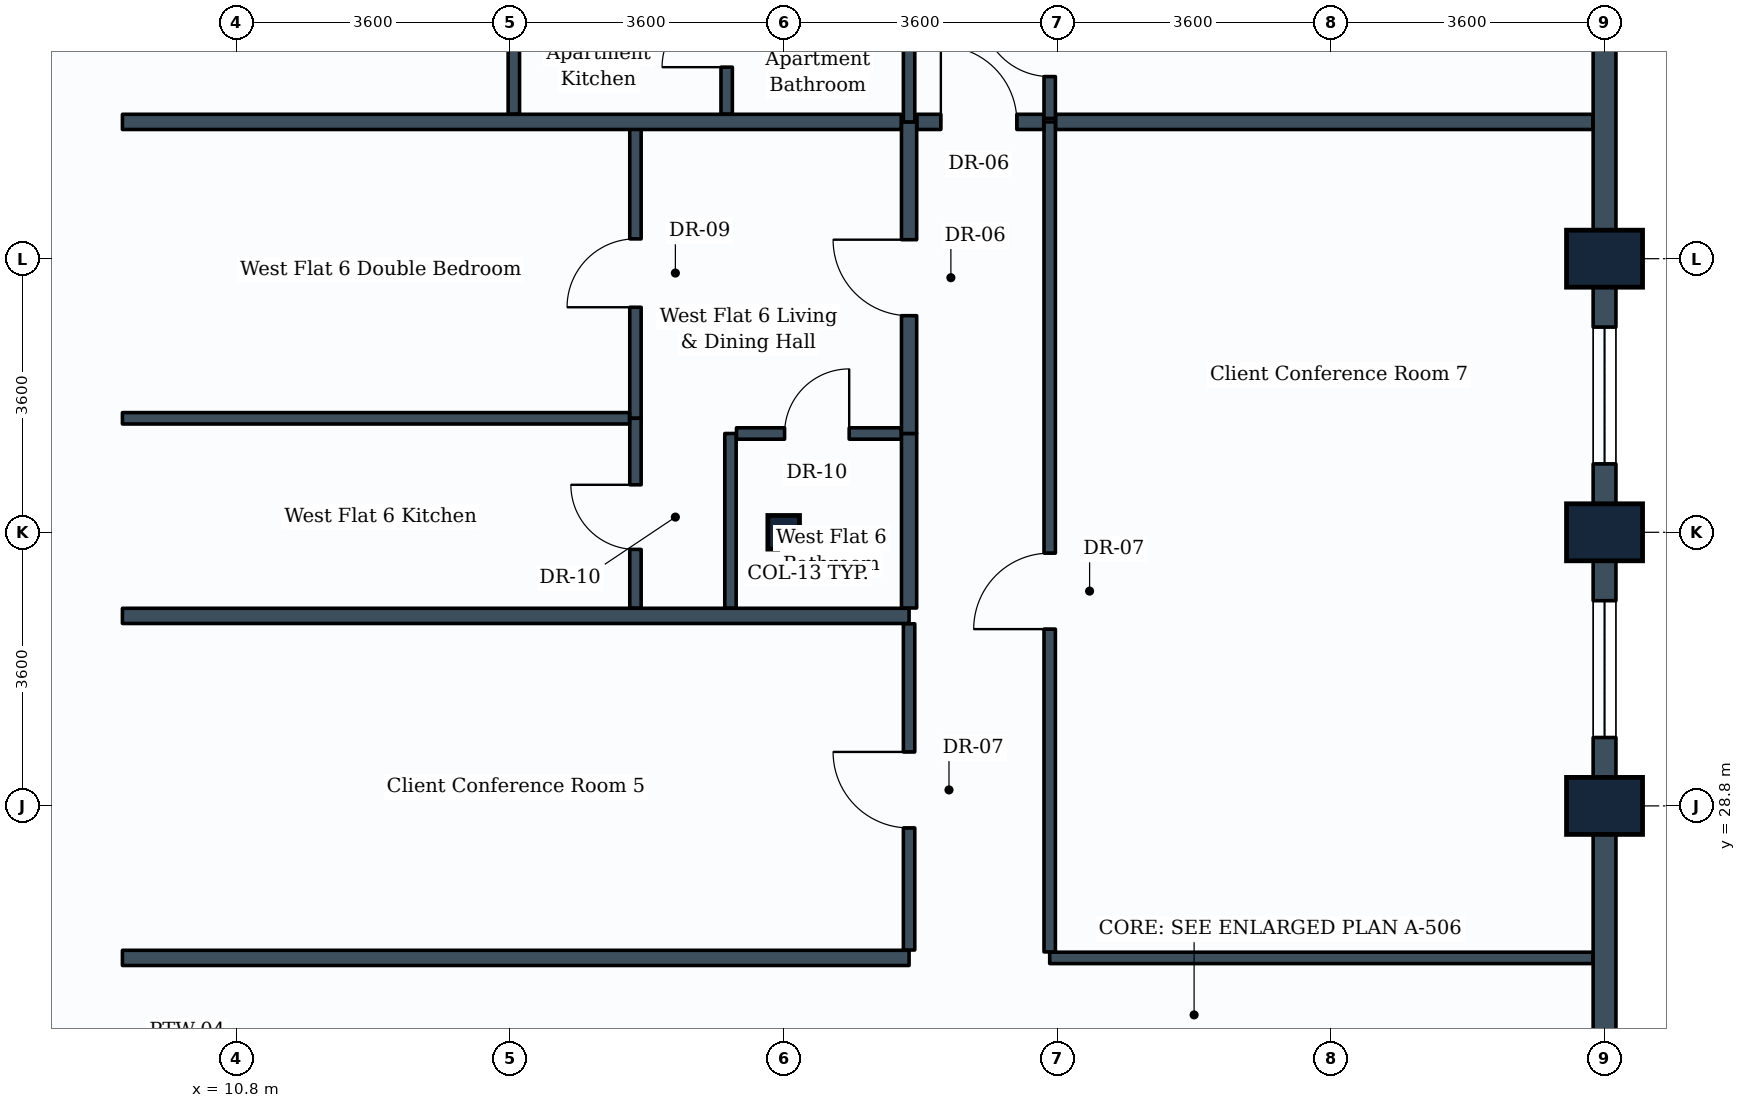
"""IFC4 building model, lengths in metres.
Left out: names, types, materials, properties, quantities, classifications, styles, units other than length and angle.
Written with IfcOpenShell. Run it as: python <this file> out.ifc"""

import sys

from ifc_helpers import new_model, si_unit, direction, frame, frame_2d, origin, origin_2d, place, context, subcontext, project, spatial, rectangle, i_section, extrude, element, fill, save


model = new_model("IFC4")
c1 = context("Model", 3, precision=1e-05, world=origin(), true_north=direction((0.0, 1.0)))
c2 = subcontext(c1, "Body", "Model", "MODEL_VIEW")
j1 = project(units=[si_unit("LENGTHUNIT", "METRE"), si_unit("PLANEANGLEUNIT", "RADIAN")], contexts=[c1])
p1 = place(None, origin())
s1 = spatial("IfcSite", under=j1, at=p1, CompositionType="ELEMENT")
p2 = place(p1, origin())
s2 = spatial("IfcBuilding", under=s1, at=p2, CompositionType="ELEMENT")
p3 = place(p2, frame((0.0, 0.0, 127.6)))
s3 = spatial("IfcBuildingStorey", under=s2, at=p3, CompositionType="ELEMENT", Elevation=127.6)
p4 = place(p3, frame((18.0, 32.4, 0.0), z_axis=(0.0, 0.0, 1.0), x_axis=(1.0, 0.0, 0.0)))
e1 = element("IfcColumn", 1, at=p4, inside=s3, PredefinedType="COLUMN", context=c2, shape_type="SweptSolid", body=[
    extrude(i_section(OverallWidth=0.416, OverallDepth=0.442, WebThickness=0.025, FlangeThickness=0.041, FilletRadius=0.015, at=origin_2d()), origin(), (0.0, 0.0, 1.0), 3.8),
])
for number, where, z_axis, x_axis in (
    (2, (28.8, 28.8, 0.0), (0.0, 0.0, 1.0), (0.0, 1.0, 0.0)),
    (3, (28.8, 32.4, 0.0), (0.0, 0.0, 1.0), (0.0, 1.0, 0.0)),
    (4, (28.8, 36.0, 0.0), (0.0, 0.0, 1.0), (0.0, 1.0, 0.0)),
):
    element("IfcColumn", number, at=place(p3, frame(where, z_axis=z_axis, x_axis=x_axis)), inside=s3, PredefinedType="COLUMN", context=c2, shape_type="SweptSolid", body=[
        extrude(rectangle(XDim=0.75, YDim=1.0, at=origin_2d()), origin(), (0.0, 0.0, 1.0), 3.8),
    ])
p5 = place(p3, frame((28.8, 28.8, 0.0), z_axis=(0.0, 0.0, 1.0), x_axis=(0.0, -1.0, 0.0)))
e5 = element("IfcWall", 5, at=p5, inside=s3, PredefinedType="STANDARD", context=c2, shape_type="SweptSolid", body=[
    extrude(rectangle(XDim=3.6, YDim=0.3, at=frame_2d((1.8, 0.0))), origin(), (0.0, 0.0, 1.0), 3.17),
])
p6 = place(p3, frame((28.8, 32.4, 0.0), z_axis=(0.0, 0.0, 1.0), x_axis=(0.0, -1.0, 0.0)))
e6 = element("IfcWall", 6, at=p6, inside=s3, PredefinedType="STANDARD", context=c2, shape_type="SweptSolid", body=[
    extrude(rectangle(XDim=3.6, YDim=0.3, at=frame_2d((1.8, 0.0))), origin(), (0.0, 0.0, 1.0), 2.93),
])
p7 = place(p6, frame((0.9, 0.0, 0.85)))
e7 = element("IfcOpeningElement", 7, at=p7, cuts=e6, PredefinedType="OPENING", context=c2, shape_type="SweptSolid", body=[
    extrude(rectangle(XDim=1.8, YDim=1.35, at=frame_2d((0.9, 0.675))), frame((0.0, 0.16, 0.0), z_axis=(0.0, -1.0, 0.0), x_axis=(1.0, 0.0, 0.0)), (0.0, 0.0, 1.0), 0.32),
])
p8 = place(p3, frame((28.8, 36.0, 0.0), z_axis=(0.0, 0.0, 1.0), x_axis=(0.0, -1.0, 0.0)))
e8 = element("IfcWall", 8, at=p8, inside=s3, PredefinedType="STANDARD", context=c2, shape_type="SweptSolid", body=[
    extrude(rectangle(XDim=3.6, YDim=0.3, at=frame_2d((1.8, 0.0))), origin(), (0.0, 0.0, 1.0), 2.93),
])
p9 = place(p8, frame((0.9, 0.0, 0.85)))
e9 = element("IfcOpeningElement", 9, at=p9, cuts=e8, PredefinedType="OPENING", context=c2, shape_type="SweptSolid", body=[
    extrude(rectangle(XDim=1.8, YDim=1.35, at=frame_2d((0.9, 0.675))), frame((0.0, 0.16, 0.0), z_axis=(0.0, -1.0, 0.0), x_axis=(1.0, 0.0, 0.0)), (0.0, 0.0, 1.0), 0.32),
])
p10 = place(p3, frame((28.8, 39.6, 0.0), z_axis=(0.0, 0.0, 1.0), x_axis=(0.0, -1.0, 0.0)))
e10 = element("IfcWall", 10, at=p10, inside=s3, PredefinedType="STANDARD", context=c2, shape_type="SweptSolid", body=[
    extrude(rectangle(XDim=3.6, YDim=0.3, at=frame_2d((1.8, 0.0))), origin(), (0.0, 0.0, 1.0), 2.93),
])
p11 = place(p3, frame((9.3, 26.8, 0.0), z_axis=(0.0, 0.0, 1.0), x_axis=(1.0, 0.0, 0.0)))
e11 = element("IfcWall", 11, at=p11, inside=s3, PredefinedType="PARTITIONING", context=c2, shape_type="SweptSolid", body=[
    extrude(rectangle(XDim=10.35, YDim=0.2, at=frame_2d((5.175, 0.0))), origin(), (0.0, 0.0, 1.0), 3.17),
])
p12 = place(p3, frame((9.3, 31.3, 0.0), z_axis=(0.0, 0.0, 1.0), x_axis=(1.0, 0.0, 0.0)))
e12 = element("IfcWall", 12, at=p12, inside=s3, PredefinedType="PARTITIONING", context=c2, shape_type="SweptSolid", body=[
    extrude(rectangle(XDim=10.35, YDim=0.2, at=frame_2d((5.175, 0.0))), origin(), (0.0, 0.0, 1.0), 3.08),
])
p13 = place(p3, frame((19.65, 26.904, 0.0), z_axis=(0.0, 0.0, 1.0), x_axis=(0.0, 1.0, 0.0)))
e13 = element("IfcWall", 13, at=p13, inside=s3, PredefinedType="PARTITIONING", context=c2, shape_type="SweptSolid", body=[
    extrude(rectangle(XDim=4.292, YDim=0.15, at=frame_2d((2.146, 0.0))), origin(), (0.0, 0.0, 1.0), 3.17),
])
p14 = place(p13, frame((1.606, 0.0, 0.0)))
e14 = element("IfcOpeningElement", 14, at=p14, cuts=e13, PredefinedType="OPENING", context=c2, shape_type="SweptSolid", body=[
    extrude(rectangle(XDim=1.0, YDim=2.1, at=frame_2d((0.5, 1.05))), frame((0.0, 0.085, 0.0), z_axis=(0.0, -1.0, 0.0), x_axis=(1.0, 0.0, 0.0)), (0.0, 0.0, 1.0), 0.17),
])
p15 = place(p3, frame((19.65, 31.404, 0.0), z_axis=(0.0, 0.0, 1.0), x_axis=(0.0, 1.0, 0.0)))
e15 = element("IfcWall", 15, at=p15, inside=s3, PredefinedType="PARTITIONING", context=c2, shape_type="SweptSolid", body=[
    extrude(rectangle(XDim=2.296, YDim=0.2, at=frame_2d((1.148, 0.0))), origin(), (0.0, 0.0, 1.0), 3.18),
])
p16 = place(p3, frame((17.3, 31.404, 0.0), z_axis=(0.0, 0.0, 1.0), x_axis=(0.0, 1.0, 0.0)))
e16 = element("IfcWall", 16, at=p16, inside=s3, PredefinedType="PARTITIONING", context=c2, shape_type="SweptSolid", body=[
    extrude(rectangle(XDim=2.296, YDim=0.15, at=frame_2d((1.148, 0.0))), origin(), (0.0, 0.0, 1.0), 3.18),
])
p17 = place(p3, frame((17.379, 33.7, 0.0), z_axis=(0.0, 0.0, 1.0), x_axis=(1.0, 0.0, 0.0)))
e17 = element("IfcWall", 17, at=p17, inside=s3, PredefinedType="PARTITIONING", context=c2, shape_type="SweptSolid", body=[
    extrude(rectangle(XDim=2.167, YDim=0.15, at=frame_2d((1.083, 0.0))), origin(), (0.0, 0.0, 1.0), 3.17),
])
p18 = place(p17, frame((0.633, 0.0, 0.0)))
e18 = element("IfcOpeningElement", 18, at=p18, cuts=e17, PredefinedType="OPENING", context=c2, shape_type="SweptSolid", body=[
    extrude(rectangle(XDim=0.85, YDim=2.1, at=frame_2d((0.425, 1.05))), frame((0.0, 0.085, 0.0), z_axis=(0.0, -1.0, 0.0), x_axis=(1.0, 0.0, 0.0)), (0.0, 0.0, 1.0), 0.17),
])
p19 = place(p3, frame((19.65, 33.7, 0.0), z_axis=(0.0, 0.0, 1.0), x_axis=(0.0, 1.0, 0.0)))
e19 = element("IfcWall", 19, at=p19, inside=s3, PredefinedType="PARTITIONING", context=c2, shape_type="SweptSolid", body=[
    extrude(rectangle(XDim=4.1, YDim=0.2, at=frame_2d((2.05, 0.0))), origin(), (0.0, 0.0, 1.0), 3.17),
])
p20 = place(p19, frame((1.55, 0.0, 0.0)))
e20 = element("IfcOpeningElement", 20, at=p20, cuts=e19, PredefinedType="OPENING", context=c2, shape_type="SweptSolid", body=[
    extrude(rectangle(XDim=1.0, YDim=2.1, at=frame_2d((0.5, 1.05))), frame((0.0, 0.11, 0.0), z_axis=(0.0, -1.0, 0.0), x_axis=(1.0, 0.0, 0.0)), (0.0, 0.0, 1.0), 0.22),
])
p21 = place(p3, frame((16.05, 33.9, 0.0), z_axis=(0.0, 0.0, 1.0), x_axis=(0.0, 1.0, 0.0)))
e21 = element("IfcWall", 21, at=p21, inside=s3, PredefinedType="PARTITIONING", context=c2, shape_type="SweptSolid", body=[
    extrude(rectangle(XDim=3.9, YDim=0.15, at=frame_2d((1.95, 0.0))), origin(), (0.0, 0.0, 1.0), 3.17),
])
p22 = place(p21, frame((1.461, 0.0, 0.0)))
e22 = element("IfcOpeningElement", 22, at=p22, cuts=e21, PredefinedType="OPENING", context=c2, shape_type="SweptSolid", body=[
    extrude(rectangle(XDim=0.9, YDim=2.1, at=frame_2d((0.45, 1.05))), frame((0.0, 0.085, 0.0), z_axis=(0.0, -1.0, 0.0), x_axis=(1.0, 0.0, 0.0)), (0.0, 0.0, 1.0), 0.17),
])
p23 = place(p3, frame((16.05, 31.404, 0.0), z_axis=(0.0, 0.0, 1.0), x_axis=(0.0, 1.0, 0.0)))
e23 = element("IfcWall", 23, at=p23, inside=s3, PredefinedType="PARTITIONING", context=c2, shape_type="SweptSolid", body=[
    extrude(rectangle(XDim=2.496, YDim=0.15, at=frame_2d((1.248, 0.0))), origin(), (0.0, 0.0, 1.0), 3.18),
])
p24 = place(p23, frame((0.771, 0.0, 0.0)))
e24 = element("IfcOpeningElement", 24, at=p24, cuts=e23, PredefinedType="OPENING", context=c2, shape_type="SweptSolid", body=[
    extrude(rectangle(XDim=0.85, YDim=2.1, at=frame_2d((0.425, 1.05))), frame((0.0, 0.085, 0.0), z_axis=(0.0, -1.0, 0.0), x_axis=(1.0, 0.0, 0.0)), (0.0, 0.0, 1.0), 0.17),
])
p25 = place(p3, frame((9.3, 33.9, 0.0), z_axis=(0.0, 0.0, 1.0), x_axis=(1.0, 0.0, 0.0)))
e25 = element("IfcWall", 25, at=p25, inside=s3, PredefinedType="PARTITIONING", context=c2, shape_type="SweptSolid", body=[
    extrude(rectangle(XDim=6.671, YDim=0.15, at=frame_2d((3.335, 0.0))), origin(), (0.0, 0.0, 1.0), 3.08),
])
p26 = place(p3, frame((21.5, 26.8, 0.0), z_axis=(0.0, 0.0, 1.0), x_axis=(1.0, 0.0, 0.0)))
e26 = element("IfcWall", 26, at=p26, inside=s3, PredefinedType="PARTITIONING", context=c2, shape_type="SweptSolid", body=[
    extrude(rectangle(XDim=7.146, YDim=0.15, at=frame_2d((3.573, 0.0))), origin(), (0.0, 0.0, 1.0), 3.535),
])
p27 = place(p3, frame((21.5, 26.879, 0.0), z_axis=(0.0, 0.0, 1.0), x_axis=(0.0, 1.0, 0.0)))
e27 = element("IfcWall", 27, at=p27, inside=s3, PredefinedType="PARTITIONING", context=c2, shape_type="SweptSolid", body=[
    extrude(rectangle(XDim=10.921, YDim=0.15, at=frame_2d((5.46, 0.0))), origin(), (0.0, 0.0, 1.0), 3.13),
])
p28 = place(p27, frame((4.247, 0.0, 0.0)))
e28 = element("IfcOpeningElement", 28, at=p28, cuts=e27, PredefinedType="OPENING", context=c2, shape_type="SweptSolid", body=[
    extrude(rectangle(XDim=1.0, YDim=2.1, at=frame_2d((0.5, 1.05))), frame((0.0, 0.085, 0.0), z_axis=(0.0, -1.0, 0.0), x_axis=(1.0, 0.0, 0.0)), (0.0, 0.0, 1.0), 0.17),
])
p29 = place(p3, frame((9.3, 37.8, 0.0), z_axis=(0.0, 0.0, 1.0), x_axis=(1.0, 0.0, 0.0)))
e29 = element("IfcWall", 29, at=p29, inside=s3, PredefinedType="PARTITIONING", context=c2, shape_type="SweptSolid", body=[
    extrude(rectangle(XDim=10.246, YDim=0.2, at=frame_2d((5.123, 0.0))), origin(), (0.0, 0.0, 1.0), 3.17),
])
p30 = place(p3, frame((21.579, 37.8, 0.0), z_axis=(0.0, 0.0, 1.0), x_axis=(1.0, 0.0, 0.0)))
e30 = element("IfcWall", 30, at=p30, inside=s3, PredefinedType="PARTITIONING", context=c2, shape_type="SweptSolid", body=[
    extrude(rectangle(XDim=7.067, YDim=0.2, at=frame_2d((3.533, 0.0))), origin(), (0.0, 0.0, 1.0), 2.93),
])
p31 = place(p3, frame((19.754, 37.8, 0.0), z_axis=(0.0, 0.0, 1.0), x_axis=(1.0, 0.0, 0.0)))
e31 = element("IfcWall", 31, at=p31, inside=s3, PredefinedType="PARTITIONING", context=c2, shape_type="SweptSolid", body=[
    extrude(rectangle(XDim=1.667, YDim=0.2, at=frame_2d((0.833, 0.0))), origin(), (0.0, 0.0, 1.0), 3.535),
])
p32 = place(p31, frame((0.314, 0.0, 0.0)))
e32 = element("IfcOpeningElement", 32, at=p32, cuts=e31, PredefinedType="OPENING", context=c2, shape_type="SweptSolid", body=[
    extrude(rectangle(XDim=1.0, YDim=2.1, at=frame_2d((0.5, 1.05))), frame((0.0, 0.11, 0.0), z_axis=(0.0, -1.0, 0.0), x_axis=(1.0, 0.0, 0.0)), (0.0, 0.0, 1.0), 0.22),
])
p33 = place(p3, frame((19.65, 37.8, 0.0), z_axis=(0.0, 0.0, 1.0), x_axis=(0.0, 1.0, 0.0)))
e33 = element("IfcWall", 33, at=p33, inside=s3, PredefinedType="PARTITIONING", context=c2, shape_type="SweptSolid", body=[
    extrude(rectangle(XDim=2.35, YDim=0.15, at=frame_2d((1.175, 0.0))), origin(), (0.0, 0.0, 1.0), 3.535),
])
p34 = place(p3, frame((17.25, 37.904, 0.0), z_axis=(0.0, 0.0, 1.0), x_axis=(0.0, 1.0, 0.0)))
e34 = element("IfcWall", 34, at=p34, inside=s3, PredefinedType="PARTITIONING", context=c2, shape_type="SweptSolid", body=[
    extrude(rectangle(XDim=2.246, YDim=0.15, at=frame_2d((1.123, 0.0))), origin(), (0.0, 0.0, 1.0), 3.535),
])
p35 = place(p34, frame((0.616, 0.0, 0.0)))
e35 = element("IfcOpeningElement", 35, at=p35, cuts=e34, PredefinedType="OPENING", context=c2, shape_type="SweptSolid", body=[
    extrude(rectangle(XDim=0.85, YDim=2.1, at=frame_2d((0.425, 1.05))), frame((0.0, 0.085, 0.0), z_axis=(0.0, -1.0, 0.0), x_axis=(1.0, 0.0, 0.0)), (0.0, 0.0, 1.0), 0.17),
])
p36 = place(p3, frame((21.5, 37.846, 0.0), z_axis=(0.0, 0.0, 1.0), x_axis=(0.0, 1.0, 0.0)))
e36 = element("IfcWall", 36, at=p36, inside=s3, PredefinedType="PARTITIONING", context=c2, shape_type="SweptSolid", body=[
    extrude(rectangle(XDim=5.2, YDim=0.15, at=frame_2d((2.6, 0.0))), origin(), (0.0, 0.0, 1.0), 2.93),
])
p37 = place(p36, frame((0.55, 0.0, 0.0)))
e37 = element("IfcOpeningElement", 37, at=p37, cuts=e36, PredefinedType="OPENING", context=c2, shape_type="SweptSolid", body=[
    extrude(rectangle(XDim=0.9, YDim=2.1, at=frame_2d((0.45, 1.05))), frame((0.0, 0.085, 0.0), z_axis=(0.0, -1.0, 0.0), x_axis=(1.0, 0.0, 0.0)), (0.0, 0.0, 1.0), 0.17),
])
p38 = place(p3, frame((14.45, 37.904, 0.0), z_axis=(0.0, 0.0, 1.0), x_axis=(0.0, 1.0, 0.0)))
e38 = element("IfcWall", 38, at=p38, inside=s3, PredefinedType="PARTITIONING", context=c2, shape_type="SweptSolid", body=[
    extrude(rectangle(XDim=2.246, YDim=0.15, at=frame_2d((1.123, 0.0))), origin(), (0.0, 0.0, 1.0), 3.535),
])
p39 = place(p7, origin())
e39 = element("IfcWindow", 39, at=p39, inside=s3, PartitioningType="SINGLE_PANEL", PredefinedType="WINDOW", context=c2, shape_type="SweptSolid", body=[
    extrude(rectangle(XDim=1.8, YDim=1.35, at=frame_2d((0.9, 0.675))), frame((0.0, 0.03, 0.0), z_axis=(0.0, -1.0, 0.0), x_axis=(1.0, 0.0, 0.0)), (0.0, 0.0, 1.0), 0.06),
])
fill(e7, e39)
p40 = place(p9, origin())
e40 = element("IfcWindow", 40, at=p40, inside=s3, PartitioningType="SINGLE_PANEL", PredefinedType="WINDOW", context=c2, shape_type="SweptSolid", body=[
    extrude(rectangle(XDim=1.8, YDim=1.35, at=frame_2d((0.9, 0.675))), frame((0.0, 0.03, 0.0), z_axis=(0.0, -1.0, 0.0), x_axis=(1.0, 0.0, 0.0)), (0.0, 0.0, 1.0), 0.06),
])
fill(e9, e40)
p41 = place(p14, origin())
e41 = element("IfcDoor", 41, at=p41, inside=s3, OperationType="SINGLE_SWING_RIGHT", PredefinedType="DOOR", context=c2, shape_type="SweptSolid", body=[
    extrude(rectangle(XDim=1.0, YDim=2.1, at=frame_2d((0.5, 1.05))), frame((0.0, 0.025, 0.0), z_axis=(0.0, -1.0, 0.0), x_axis=(1.0, 0.0, 0.0)), (0.0, 0.0, 1.0), 0.05),
])
fill(e14, e41)
p42 = place(p18, origin())
e42 = element("IfcDoor", 42, at=p42, inside=s3, OperationType="SINGLE_SWING_RIGHT", PredefinedType="DOOR", context=c2, shape_type="SweptSolid", body=[
    extrude(rectangle(XDim=0.85, YDim=2.1, at=frame_2d((0.425, 1.05))), frame((0.0, 0.025, 0.0), z_axis=(0.0, -1.0, 0.0), x_axis=(1.0, 0.0, 0.0)), (0.0, 0.0, 1.0), 0.05),
])
fill(e18, e42)
p43 = place(p20, origin())
e43 = element("IfcDoor", 43, at=p43, inside=s3, OperationType="SINGLE_SWING_RIGHT", PredefinedType="DOOR", context=c2, shape_type="SweptSolid", body=[
    extrude(rectangle(XDim=1.0, YDim=2.1, at=frame_2d((0.5, 1.05))), frame((0.0, 0.025, 0.0), z_axis=(0.0, -1.0, 0.0), x_axis=(1.0, 0.0, 0.0)), (0.0, 0.0, 1.0), 0.05),
])
fill(e20, e43)
p44 = place(p22, origin())
e44 = element("IfcDoor", 44, at=p44, inside=s3, OperationType="SINGLE_SWING_LEFT", PredefinedType="DOOR", context=c2, shape_type="SweptSolid", body=[
    extrude(rectangle(XDim=0.9, YDim=2.1, at=frame_2d((0.45, 1.05))), frame((0.0, 0.025, 0.0), z_axis=(0.0, -1.0, 0.0), x_axis=(1.0, 0.0, 0.0)), (0.0, 0.0, 1.0), 0.05),
])
fill(e22, e44)
p45 = place(p24, origin())
e45 = element("IfcDoor", 45, at=p45, inside=s3, OperationType="SINGLE_SWING_RIGHT", PredefinedType="DOOR", context=c2, shape_type="SweptSolid", body=[
    extrude(rectangle(XDim=0.85, YDim=2.1, at=frame_2d((0.425, 1.05))), frame((0.0, 0.025, 0.0), z_axis=(0.0, -1.0, 0.0), x_axis=(1.0, 0.0, 0.0)), (0.0, 0.0, 1.0), 0.05),
])
fill(e24, e45)
p46 = place(p28, origin())
e46 = element("IfcDoor", 46, at=p46, inside=s3, OperationType="SINGLE_SWING_LEFT", PredefinedType="DOOR", context=c2, shape_type="SweptSolid", body=[
    extrude(rectangle(XDim=1.0, YDim=2.1, at=frame_2d((0.5, 1.05))), frame((0.0, 0.025, 0.0), z_axis=(0.0, -1.0, 0.0), x_axis=(1.0, 0.0, 0.0)), (0.0, 0.0, 1.0), 0.05),
])
fill(e28, e46)
p47 = place(p32, origin())
e47 = element("IfcDoor", 47, at=p47, inside=s3, OperationType="SINGLE_SWING_LEFT", PredefinedType="DOOR", context=c2, shape_type="SweptSolid", body=[
    extrude(rectangle(XDim=1.0, YDim=2.1, at=frame_2d((0.5, 1.05))), frame((0.0, 0.025, 0.0), z_axis=(0.0, -1.0, 0.0), x_axis=(1.0, 0.0, 0.0)), (0.0, 0.0, 1.0), 0.05),
])
fill(e32, e47)
p48 = place(p35, origin())
e48 = element("IfcDoor", 48, at=p48, inside=s3, OperationType="SINGLE_SWING_LEFT", PredefinedType="DOOR", context=c2, shape_type="SweptSolid", body=[
    extrude(rectangle(XDim=0.85, YDim=2.1, at=frame_2d((0.425, 1.05))), frame((0.0, 0.025, 0.0), z_axis=(0.0, -1.0, 0.0), x_axis=(1.0, 0.0, 0.0)), (0.0, 0.0, 1.0), 0.05),
])
fill(e35, e48)
p49 = place(p37, origin())
e49 = element("IfcDoor", 49, at=p49, inside=s3, OperationType="SINGLE_SWING_RIGHT", PredefinedType="DOOR", context=c2, shape_type="SweptSolid", body=[
    extrude(rectangle(XDim=0.9, YDim=2.1, at=frame_2d((0.45, 1.05))), frame((0.0, 0.025, 0.0), z_axis=(0.0, -1.0, 0.0), x_axis=(1.0, 0.0, 0.0)), (0.0, 0.0, 1.0), 0.05),
])
fill(e37, e49)
save(model, sys.argv[1])
